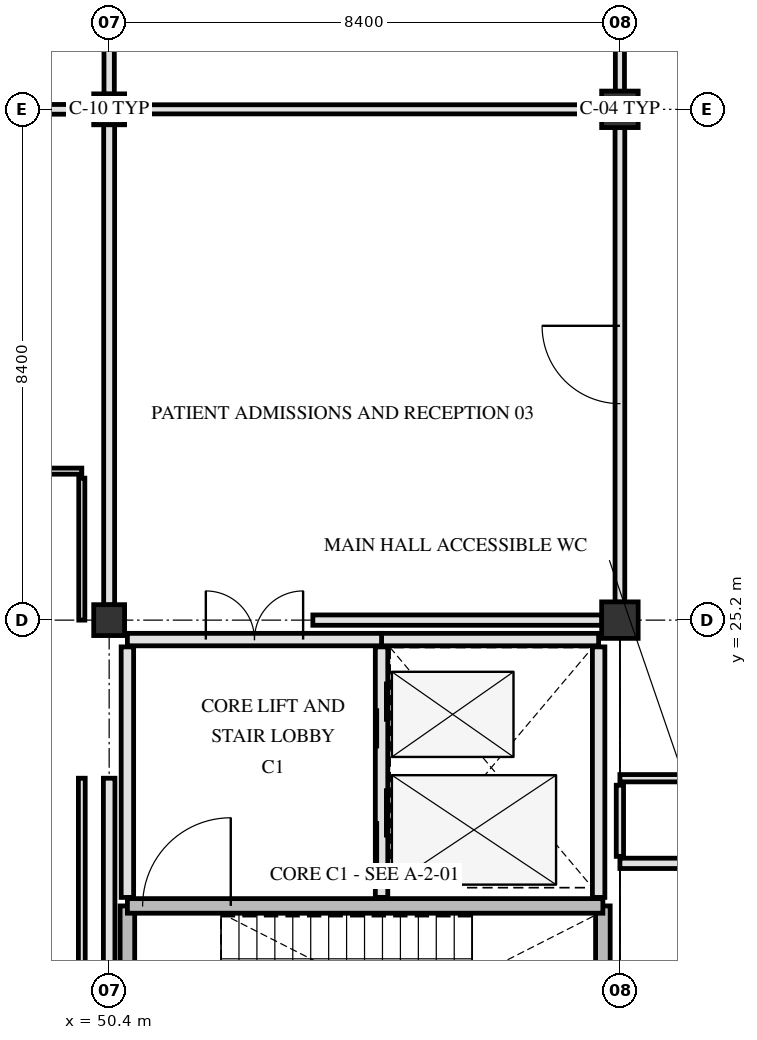
"""IFC4 building model, lengths in metres.
Left out: names, types, materials, properties, quantities, classifications, styles, units other than length and angle.
Written with IfcOpenShell. Run it as: python <this file> out.ifc"""

import sys

from ifc_helpers import new_model, si_unit, direction, frame, frame_2d, origin, origin_2d, place, context, subcontext, project, spatial, rectangle, hollow_circle, extrude, element, fill, save


model = new_model("IFC4")
c1 = context("Model", 3, precision=1e-05, world=origin(), true_north=direction((0.0, 1.0)))
c2 = subcontext(c1, "Body", "Model", "MODEL_VIEW")
j1 = project(units=[si_unit("LENGTHUNIT", "METRE"), si_unit("PLANEANGLEUNIT", "RADIAN")], contexts=[c1])
p1 = place(None, origin())
s1 = spatial("IfcSite", under=j1, at=p1, CompositionType="ELEMENT")
p2 = place(p1, origin())
s2 = spatial("IfcBuilding", under=s1, at=p2, CompositionType="ELEMENT")
p3 = place(p2, origin())
s3 = spatial("IfcBuildingStorey", under=s2, at=p3, CompositionType="ELEMENT", Elevation=0.0)
for number, where, z_axis, x_axis in (
    (1, (50.4, 25.2, 0.0), (0.0, 0.0, 1.0), (1.0, 0.0, 0.0)),
    (2, (50.4, 33.6, 0.0), (0.0, 0.0, 1.0), (1.0, 0.0, 0.0)),
):
    element("IfcColumn", number, at=place(p3, frame(where, z_axis=z_axis, x_axis=x_axis)), inside=s3, PredefinedType="COLUMN", context=c2, shape_type="SweptSolid", body=[
        extrude(hollow_circle(Radius=0.254, WallThickness=0.02, at=origin_2d()), origin(), (0.0, 0.0, 1.0), 4.8),
    ])
for number, where, z_axis, x_axis in (
    (3, (58.8, 25.2, 0.0), (0.0, 0.0, 1.0), (1.0, 0.0, 0.0)),
    (4, (58.8, 33.6, 0.0), (0.0, 0.0, 1.0), (1.0, 0.0, 0.0)),
):
    element("IfcColumn", number, at=place(p3, frame(where, z_axis=z_axis, x_axis=x_axis)), inside=s3, PredefinedType="COLUMN", context=c2, shape_type="SweptSolid", body=[
        extrude(rectangle(XDim=0.6, YDim=0.6, at=origin_2d()), origin(), (0.0, 0.0, 1.0), 4.8),
    ])
for number, where, z_axis, x_axis in (
    (5, (50.7, 17.18, 0.0), (0.0, 0.0, 1.0), (0.0, 1.0, 0.0)),
    (6, (58.52, 17.18, 0.0), (0.0, 0.0, 1.0), (0.0, 1.0, 0.0)),
):
    element("IfcWall", number, at=place(p3, frame(where, z_axis=z_axis, x_axis=x_axis)), inside=s3, PredefinedType="SHEAR", context=c2, shape_type="SweptSolid", body=[
        extrude(rectangle(XDim=3.32, YDim=0.24, at=frame_2d((1.66, 0.0))), origin(), (0.0, 0.0, 1.0), 4.5),
    ])
p4 = place(p3, frame((50.7, 20.5, 0.0), z_axis=(0.0, 0.0, 1.0), x_axis=(1.0, 0.0, 0.0)))
e7 = element("IfcWall", 7, at=p4, inside=s3, PredefinedType="SHEAR", context=c2, shape_type="SweptSolid", body=[
    extrude(rectangle(XDim=7.82, YDim=0.24, at=frame_2d((3.91, 0.0))), origin(), (0.0, 0.0, 1.0), 4.5),
])
p5 = place(p4, frame((0.25, 0.0, 0.0)))
e8 = element("IfcOpeningElement", 8, at=p5, cuts=e7, PredefinedType="OPENING", context=c2, shape_type="SweptSolid", body=[
    extrude(rectangle(XDim=1.45, YDim=2.2, at=frame_2d((0.725, 1.1))), frame((0.0, 0.13, 0.0), z_axis=(0.0, -1.0, 0.0), x_axis=(1.0, 0.0, 0.0)), (0.0, 0.0, 1.0), 0.26),
])
p6 = place(p3, frame((54.88, 20.64, 0.0), z_axis=(0.0, 0.0, 1.0), x_axis=(0.0, 1.0, 0.0)))
e9 = element("IfcWall", 9, at=p6, inside=s3, PredefinedType="PARTITIONING", context=c2, shape_type="SweptSolid", body=[
    extrude(rectangle(XDim=4.12, YDim=0.205, at=frame_2d((2.06, 0.0))), origin(), (0.0, 0.0, 1.0), 4.49),
])
p7 = place(p6, frame((0.445, 0.0, 0.0)))
e10 = element("IfcOpeningElement", 10, at=p7, cuts=e9, PredefinedType="OPENING", context=c2, shape_type="SweptSolid", body=[
    extrude(rectangle(XDim=1.35, YDim=2.2, at=frame_2d((0.675, 1.1))), frame((0.0, 0.113, 0.0), z_axis=(0.0, -1.0, 0.0), x_axis=(1.0, 0.0, 0.0)), (0.0, 0.0, 1.0), 0.225),
])
p8 = place(p6, frame((2.45, 0.0, 0.0)))
e11 = element("IfcOpeningElement", 11, at=p8, cuts=e9, PredefinedType="OPENING", context=c2, shape_type="SweptSolid", body=[
    extrude(rectangle(XDim=1.1, YDim=2.15, at=frame_2d((0.55, 1.075))), frame((0.0, 0.113, 0.0), z_axis=(0.0, -1.0, 0.0), x_axis=(1.0, 0.0, 0.0)), (0.0, 0.0, 1.0), 0.225),
])
p9 = place(p3, frame((58.45, 20.64, 0.0), z_axis=(0.0, 0.0, 1.0), x_axis=(0.0, 1.0, 0.0)))
e12 = element("IfcWall", 12, at=p9, inside=s3, PredefinedType="PARTITIONING", context=c2, shape_type="SweptSolid", body=[
    extrude(rectangle(XDim=4.12, YDim=0.205, at=frame_2d((2.06, 0.0))), origin(), (0.0, 0.0, 1.0), 4.49),
])
p10 = place(p3, frame((54.88, 24.88, 0.0), z_axis=(0.0, 0.0, 1.0), x_axis=(1.0, 0.0, 0.0)))
e13 = element("IfcWall", 13, at=p10, inside=s3, PredefinedType="PARTITIONING", context=c2, shape_type="SweptSolid", body=[
    extrude(rectangle(XDim=3.57, YDim=0.205, at=frame_2d((1.785, 0.0))), origin(), (0.0, 0.0, 1.0), 3.84),
])
p11 = place(p3, frame((50.7, 20.64, 0.0), z_axis=(0.0, 0.0, 1.0), x_axis=(0.0, 1.0, 0.0)))
e14 = element("IfcWall", 14, at=p11, inside=s3, PredefinedType="PARTITIONING", context=c2, shape_type="SweptSolid", body=[
    extrude(rectangle(XDim=4.12, YDim=0.205, at=frame_2d((2.06, 0.0))), origin(), (0.0, 0.0, 1.0), 4.49),
])
p12 = place(p3, frame((50.7, 24.88, 0.0), z_axis=(0.0, 0.0, 1.0), x_axis=(1.0, 0.0, 0.0)))
e15 = element("IfcWall", 15, at=p12, inside=s3, PredefinedType="PARTITIONING", context=c2, shape_type="SweptSolid", body=[
    extrude(rectangle(XDim=4.18, YDim=0.205, at=frame_2d((2.09, 0.0))), origin(), (0.0, 0.0, 1.0), 3.84),
])
p13 = place(p12, frame((1.29, 0.0, 0.0)))
e16 = element("IfcOpeningElement", 16, at=p13, cuts=e15, PredefinedType="OPENING", context=c2, shape_type="SweptSolid", body=[
    extrude(rectangle(XDim=1.6, YDim=2.25, at=frame_2d((0.8, 1.125))), frame((0.0, 0.113, 0.0), z_axis=(0.0, -1.0, 0.0), x_axis=(1.0, 0.0, 0.0)), (0.0, 0.0, 1.0), 0.225),
])
p14 = place(p3, frame((58.8, 21.2, 0.0), z_axis=(0.0, 0.0, 1.0), x_axis=(1.0, 0.0, 0.0)))
e17 = element("IfcWall", 17, at=p14, inside=s3, PredefinedType="PARTITIONING", context=c2, shape_type="SweptSolid", body=[
    extrude(rectangle(XDim=4.2, YDim=0.17, at=frame_2d((2.1, 0.0))), origin(), (0.0, 0.0, 1.0), 3.89),
])
p15 = place(p3, frame((58.8, 22.6, 0.0), z_axis=(0.0, 0.0, 1.0), x_axis=(1.0, 0.0, 0.0)))
e18 = element("IfcWall", 18, at=p15, inside=s3, PredefinedType="PARTITIONING", context=c2, shape_type="SweptSolid", body=[
    extrude(rectangle(XDim=4.2, YDim=0.12, at=frame_2d((2.1, 0.0))), origin(), (0.0, 0.0, 1.0), 3.89),
])
p16 = place(p15, frame((1.625, 0.0, 0.0)))
e19 = element("IfcOpeningElement", 19, at=p16, cuts=e18, PredefinedType="OPENING", context=c2, shape_type="SweptSolid", body=[
    extrude(rectangle(XDim=0.95, YDim=2.1, at=frame_2d((0.475, 1.05))), frame((0.0, 0.07, 0.0), z_axis=(0.0, -1.0, 0.0), x_axis=(1.0, 0.0, 0.0)), (0.0, 0.0, 1.0), 0.14),
])
p17 = place(p3, frame((53.75, 25.2, 0.0), z_axis=(0.0, 0.0, 1.0), x_axis=(1.0, 0.0, 0.0)))
e20 = element("IfcWall", 20, at=p17, inside=s3, PredefinedType="PARTITIONING", context=c2, shape_type="SweptSolid", body=[
    extrude(rectangle(XDim=4.755, YDim=0.17, at=frame_2d((2.377, 0.0))), origin(), (0.0, 0.0, 1.0), 3.84),
])
p18 = place(p3, frame((47.95, 27.65, 0.0), z_axis=(0.0, 0.0, 1.0), x_axis=(1.0, 0.0, 0.0)))
e21 = element("IfcWall", 21, at=p18, inside=s3, PredefinedType="PARTITIONING", context=c2, shape_type="SweptSolid", body=[
    extrude(rectangle(XDim=2.0, YDim=0.1, at=frame_2d((1.0, 0.0))), origin(), (0.0, 0.0, 1.0), 4.49),
])
p19 = place(p3, frame((42.245, 33.6, 0.0), z_axis=(0.0, 0.0, 1.0), x_axis=(1.0, 0.0, 0.0)))
e22 = element("IfcWall", 22, at=p19, inside=s3, PredefinedType="PARTITIONING", context=c2, shape_type="SweptSolid", body=[
    extrude(rectangle(XDim=7.906, YDim=0.16, at=frame_2d((3.953, 0.0))), origin(), (0.0, 0.0, 1.0), 3.84),
])
p20 = place(p3, frame((50.649, 33.6, 0.0), z_axis=(0.0, 0.0, 1.0), x_axis=(1.0, 0.0, 0.0)))
e23 = element("IfcWall", 23, at=p20, inside=s3, PredefinedType="PARTITIONING", context=c2, shape_type="SweptSolid", body=[
    extrude(rectangle(XDim=7.856, YDim=0.15, at=frame_2d((3.928, 0.0))), origin(), (0.0, 0.0, 1.0), 3.84),
])
p21 = place(p3, frame((49.95, 17.465, 0.0), z_axis=(0.0, 0.0, 1.0), x_axis=(0.0, 1.0, 0.0)))
e24 = element("IfcWall", 24, at=p21, inside=s3, PredefinedType="PARTITIONING", context=c2, shape_type="SweptSolid", body=[
    extrude(rectangle(XDim=5.135, YDim=0.112, at=frame_2d((2.567, 0.0))), origin(), (0.0, 0.0, 1.0), 4.49),
])
p22 = place(p3, frame((49.95, 25.2, 0.0), z_axis=(0.0, 0.0, 1.0), x_axis=(0.0, 1.0, 0.0)))
e25 = element("IfcWall", 25, at=p22, inside=s3, PredefinedType="PARTITIONING", context=c2, shape_type="SweptSolid", body=[
    extrude(rectangle(XDim=2.335, YDim=0.1, at=frame_2d((1.167, 0.0))), origin(), (0.0, 0.0, 1.0), 3.84),
])
p23 = place(p3, frame((50.4, 17.049, 0.0), z_axis=(0.0, 0.0, 1.0), x_axis=(0.0, 1.0, 0.0)))
e26 = element("IfcWall", 26, at=p23, inside=s3, PredefinedType="PARTITIONING", context=c2, shape_type="SweptSolid", body=[
    extrude(rectangle(XDim=5.551, YDim=0.19, at=frame_2d((2.775, 0.0))), origin(), (0.0, 0.0, 1.0), 4.09),
])
p24 = place(p3, frame((50.4, 25.449, 0.0), z_axis=(0.0, 0.0, 1.0), x_axis=(0.0, 1.0, 0.0)))
e27 = element("IfcWall", 27, at=p24, inside=s3, PredefinedType="PARTITIONING", context=c2, shape_type="SweptSolid", body=[
    extrude(rectangle(XDim=7.902, YDim=0.18, at=frame_2d((3.951, 0.0))), origin(), (0.0, 0.0, 1.0), 4.09),
])
p25 = place(p3, frame((50.4, 33.849, 0.0), z_axis=(0.0, 0.0, 1.0), x_axis=(0.0, 1.0, 0.0)))
e28 = element("IfcWall", 28, at=p25, inside=s3, PredefinedType="PARTITIONING", context=c2, shape_type="SweptSolid", body=[
    extrude(rectangle(XDim=7.902, YDim=0.17, at=frame_2d((3.951, 0.0))), origin(), (0.0, 0.0, 1.0), 4.09),
])
p26 = place(p3, frame((58.8, 21.315, 0.0), z_axis=(0.0, 0.0, 1.0), x_axis=(0.0, 1.0, 0.0)))
e29 = element("IfcWall", 29, at=p26, inside=s3, PredefinedType="PARTITIONING", context=c2, shape_type="SweptSolid", body=[
    extrude(rectangle(XDim=1.17, YDim=0.12, at=frame_2d((0.585, 0.0))), origin(), (0.0, 0.0, 1.0), 3.89),
])
p27 = place(p3, frame((58.8, 25.495, 0.0), z_axis=(0.0, 0.0, 1.0), x_axis=(0.0, 1.0, 0.0)))
e30 = element("IfcWall", 30, at=p27, inside=s3, PredefinedType="PARTITIONING", context=c2, shape_type="SweptSolid", body=[
    extrude(rectangle(XDim=7.81, YDim=0.16, at=frame_2d((3.905, 0.0))), origin(), (0.0, 0.0, 1.0), 3.89),
])
p28 = place(p27, frame((3.265, 0.0, 0.0)))
e31 = element("IfcOpeningElement", 31, at=p28, cuts=e30, PredefinedType="OPENING", context=c2, shape_type="SweptSolid", body=[
    extrude(rectangle(XDim=1.28, YDim=2.18, at=frame_2d((0.64, 1.09))), frame((0.0, 0.09, 0.0), z_axis=(0.0, -1.0, 0.0), x_axis=(1.0, 0.0, 0.0)), (0.0, 0.0, 1.0), 0.18),
])
p29 = place(p3, frame((58.8, 33.895, 0.0), z_axis=(0.0, 0.0, 1.0), x_axis=(0.0, 1.0, 0.0)))
e32 = element("IfcWall", 32, at=p29, inside=s3, PredefinedType="PARTITIONING", context=c2, shape_type="SweptSolid", body=[
    extrude(rectangle(XDim=7.81, YDim=0.15, at=frame_2d((3.905, 0.0))), origin(), (0.0, 0.0, 1.0), 3.89),
])
p30 = place(p5, origin())
e33 = element("IfcDoor", 33, at=p30, inside=s3, OperationType="SINGLE_SWING_RIGHT", PredefinedType="DOOR", context=c2, shape_type="SweptSolid", body=[
    extrude(rectangle(XDim=1.45, YDim=2.2, at=frame_2d((0.725, 1.1))), frame((0.0, 0.025, 0.0), z_axis=(0.0, -1.0, 0.0), x_axis=(1.0, 0.0, 0.0)), (0.0, 0.0, 1.0), 0.05),
])
fill(e8, e33)
p31 = place(p7, origin())
e34 = element("IfcDoor", 34, at=p31, inside=s3, OperationType="SLIDING_TO_LEFT", PredefinedType="DOOR", context=c2, shape_type="SweptSolid", body=[
    extrude(rectangle(XDim=1.35, YDim=2.2, at=frame_2d((0.675, 1.1))), frame((0.0, 0.025, 0.0), z_axis=(0.0, -1.0, 0.0), x_axis=(1.0, 0.0, 0.0)), (0.0, 0.0, 1.0), 0.05),
])
fill(e10, e34)
p32 = place(p8, origin())
e35 = element("IfcDoor", 35, at=p32, inside=s3, OperationType="SLIDING_TO_LEFT", PredefinedType="DOOR", context=c2, shape_type="SweptSolid", body=[
    extrude(rectangle(XDim=1.1, YDim=2.15, at=frame_2d((0.55, 1.075))), frame((0.0, 0.025, 0.0), z_axis=(0.0, -1.0, 0.0), x_axis=(1.0, 0.0, 0.0)), (0.0, 0.0, 1.0), 0.05),
])
fill(e11, e35)
p33 = place(p13, origin())
e36 = element("IfcDoor", 36, at=p33, inside=s3, OperationType="DOUBLE_SWING_LEFT", PredefinedType="DOOR", context=c2, shape_type="SweptSolid", body=[
    extrude(rectangle(XDim=1.6, YDim=2.25, at=frame_2d((0.8, 1.125))), frame((0.0, 0.025, 0.0), z_axis=(0.0, -1.0, 0.0), x_axis=(1.0, 0.0, 0.0)), (0.0, 0.0, 1.0), 0.05),
])
fill(e16, e36)
p34 = place(p28, origin())
e37 = element("IfcDoor", 37, at=p34, inside=s3, OperationType="SINGLE_SWING_RIGHT", PredefinedType="DOOR", context=c2, shape_type="SweptSolid", body=[
    extrude(rectangle(XDim=1.28, YDim=2.18, at=frame_2d((0.64, 1.09))), frame((0.0, 0.025, 0.0), z_axis=(0.0, -1.0, 0.0), x_axis=(1.0, 0.0, 0.0)), (0.0, 0.0, 1.0), 0.05),
])
fill(e31, e37)
save(model, sys.argv[1])
